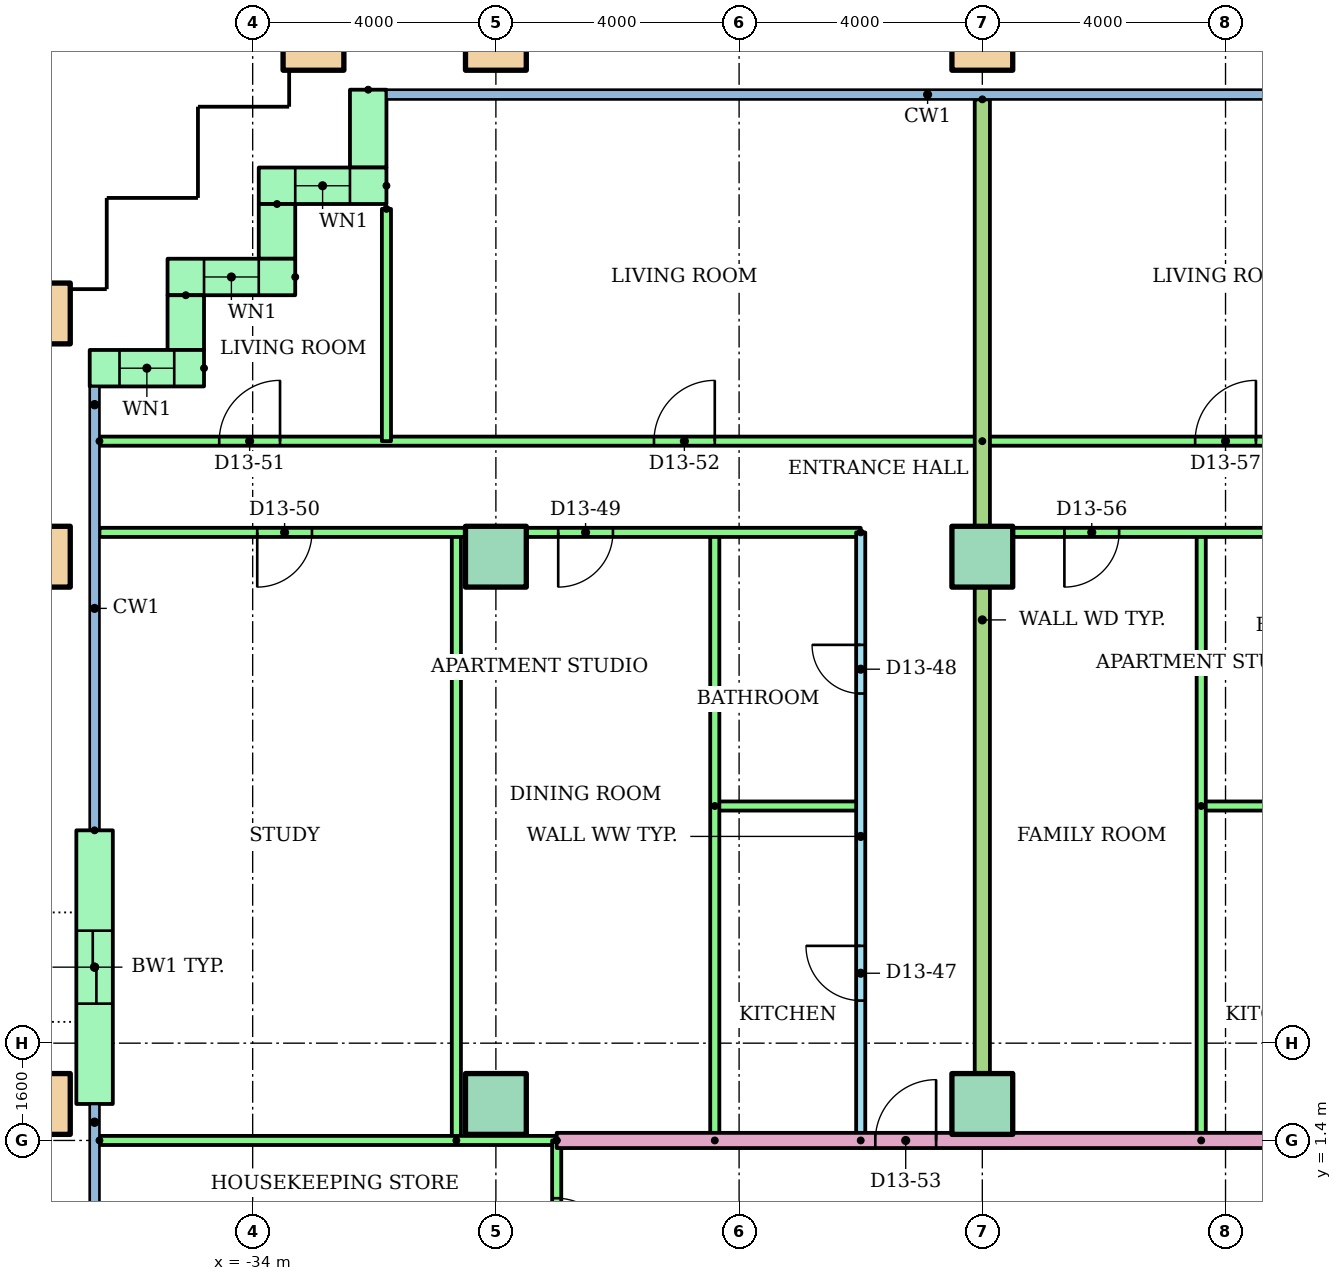
"""IFC4 building model, lengths in metres.
Left out: names, types, materials, properties, quantities, classifications, styles, units other than length and angle.
Written with IfcOpenShell. Run it as: python <this file> out.ifc"""

import sys

from ifc_helpers import new_model, si_unit, direction, frame, frame_2d, origin, origin_2d, place, context, subcontext, project, spatial, rectangle, hollow_rectangle, extrude, element, fill, save


model = new_model("IFC4")
c1 = context("Model", 3, precision=1e-05, world=origin(), true_north=direction((0.0, 1.0)))
c2 = subcontext(c1, "Body", "Model", "MODEL_VIEW")
j1 = project(units=[si_unit("LENGTHUNIT", "METRE"), si_unit("PLANEANGLEUNIT", "RADIAN")], contexts=[c1])
p1 = place(None, origin())
s1 = spatial("IfcSite", under=j1, at=p1, CompositionType="ELEMENT")
p2 = place(p1, origin())
s2 = spatial("IfcBuilding", under=s1, at=p2, CompositionType="ELEMENT")
p3 = place(p2, frame((0.0, 0.0, 51.2)))
s3 = spatial("IfcBuildingStorey", under=s2, at=p3, CompositionType="ELEMENT", Elevation=51.2)
p4 = place(p3, frame((-37.5, 2.0, 0.0)))
e1 = element("IfcColumn", 1, at=p4, inside=s3, PredefinedType="COLUMN", context=c2, shape_type="SweptSolid", body=[
    extrude(hollow_rectangle(XDim=1.0, YDim=1.0, WallThickness=0.05, at=origin_2d()), origin(), (0.0, 0.0, 1.0), 3.2),
])
for number, where in (
    (2, (-30.0, 2.0, 0.0)),
    (3, (-22.0, 2.0, 0.0)),
):
    element("IfcColumn", number, at=place(p3, frame(where)), inside=s3, PredefinedType="COLUMN", context=c2, shape_type="SweptSolid", body=[
        extrude(rectangle(XDim=1.0, YDim=1.0, at=origin_2d()), origin(), (0.0, 0.0, 1.0), 3.2),
    ])
p5 = place(p3, frame((-37.5, 11.0, 0.0)))
e4 = element("IfcColumn", 4, at=p5, inside=s3, PredefinedType="COLUMN", context=c2, shape_type="SweptSolid", body=[
    extrude(hollow_rectangle(XDim=1.0, YDim=1.0, WallThickness=0.05, at=origin_2d()), origin(), (0.0, 0.0, 1.0), 3.2),
])
for number, where in (
    (5, (-30.0, 11.0, 0.0)),
    (6, (-22.0, 11.0, 0.0)),
):
    element("IfcColumn", number, at=place(p3, frame(where)), inside=s3, PredefinedType="COLUMN", context=c2, shape_type="SweptSolid", body=[
        extrude(rectangle(XDim=1.0, YDim=1.0, at=origin_2d()), origin(), (0.0, 0.0, 1.0), 3.2),
    ])
for number, where in (
    (7, (-37.5, 15.0, 0.0)),
    (8, (-33.0, 19.5, 0.0)),
    (9, (-30.0, 19.5, 0.0)),
    (10, (-22.0, 19.5, 0.0)),
):
    element("IfcColumn", number, at=place(p3, frame(where)), inside=s3, PredefinedType="COLUMN", context=c2, shape_type="SweptSolid", body=[
        extrude(hollow_rectangle(XDim=1.0, YDim=1.0, WallThickness=0.05, at=origin_2d()), origin(), (0.0, 0.0, 1.0), 3.2),
    ])
p6 = place(p3, frame((-32.1, 18.68, 0.0), z_axis=(0.0, 0.0, 1.0), x_axis=(0.0, -1.0, 0.0)))
e11 = element("IfcWall", 11, at=p6, inside=s3, PredefinedType="STANDARD", context=c2, shape_type="SweptSolid", body=[
    extrude(rectangle(XDim=1.28, YDim=0.6, at=frame_2d((0.64, 0.0))), origin(), (0.0, 0.0, 1.0), 2.92),
])
p7 = place(p3, frame((-31.8, 17.1, 0.0), z_axis=(0.0, 0.0, 1.0), x_axis=(-1.0, 0.0, 0.0)))
e12 = element("IfcWall", 12, at=p7, inside=s3, PredefinedType="STANDARD", context=c2, shape_type="SweptSolid", body=[
    extrude(rectangle(XDim=2.1, YDim=0.6, at=frame_2d((1.05, 0.0))), origin(), (0.0, 0.0, 1.0), 2.92),
])
p8 = place(p7, frame((0.6, 0.0, 0.9)))
e13 = element("IfcOpeningElement", 13, at=p8, cuts=e12, PredefinedType="OPENING", context=c2, shape_type="SweptSolid", body=[
    extrude(rectangle(XDim=0.9, YDim=1.5, at=frame_2d((0.45, 0.75))), frame((0.0, 0.31, 0.0), z_axis=(0.0, -1.0, 0.0), x_axis=(1.0, 0.0, 0.0)), (0.0, 0.0, 1.0), 0.62),
])
p9 = place(p3, frame((-33.6, 16.8, 0.0), z_axis=(0.0, 0.0, 1.0), x_axis=(0.0, -1.0, 0.0)))
e14 = element("IfcWall", 14, at=p9, inside=s3, PredefinedType="STANDARD", context=c2, shape_type="SweptSolid", body=[
    extrude(rectangle(XDim=0.9, YDim=0.6, at=frame_2d((0.45, 0.0))), origin(), (0.0, 0.0, 1.0), 2.92),
])
p10 = place(p3, frame((-33.3, 15.6, 0.0), z_axis=(0.0, 0.0, 1.0), x_axis=(-1.0, 0.0, 0.0)))
e15 = element("IfcWall", 15, at=p10, inside=s3, PredefinedType="STANDARD", context=c2, shape_type="SweptSolid", body=[
    extrude(rectangle(XDim=2.1, YDim=0.6, at=frame_2d((1.05, 0.0))), origin(), (0.0, 0.0, 1.0), 2.92),
])
p11 = place(p10, frame((0.6, 0.0, 0.9)))
e16 = element("IfcOpeningElement", 16, at=p11, cuts=e15, PredefinedType="OPENING", context=c2, shape_type="SweptSolid", body=[
    extrude(rectangle(XDim=0.9, YDim=1.5, at=frame_2d((0.45, 0.75))), frame((0.0, 0.31, 0.0), z_axis=(0.0, -1.0, 0.0), x_axis=(1.0, 0.0, 0.0)), (0.0, 0.0, 1.0), 0.62),
])
p12 = place(p3, frame((-35.1, 15.3, 0.0), z_axis=(0.0, 0.0, 1.0), x_axis=(0.0, -1.0, 0.0)))
e17 = element("IfcWall", 17, at=p12, inside=s3, PredefinedType="STANDARD", context=c2, shape_type="SweptSolid", body=[
    extrude(rectangle(XDim=0.9, YDim=0.6, at=frame_2d((0.45, 0.0))), origin(), (0.0, 0.0, 1.0), 2.92),
])
p13 = place(p3, frame((-34.8, 14.1, 0.0), z_axis=(0.0, 0.0, 1.0), x_axis=(-1.0, 0.0, 0.0)))
e18 = element("IfcWall", 18, at=p13, inside=s3, PredefinedType="STANDARD", context=c2, shape_type="SweptSolid", body=[
    extrude(rectangle(XDim=1.88, YDim=0.6, at=frame_2d((0.94, 0.0))), origin(), (0.0, 0.0, 1.0), 2.92),
])
p14 = place(p13, frame((0.49, 0.0, 0.9)))
e19 = element("IfcOpeningElement", 19, at=p14, cuts=e18, PredefinedType="OPENING", context=c2, shape_type="SweptSolid", body=[
    extrude(rectangle(XDim=0.9, YDim=1.5, at=frame_2d((0.45, 0.75))), frame((0.0, 0.31, 0.0), z_axis=(0.0, -1.0, 0.0), x_axis=(1.0, 0.0, 0.0)), (0.0, 0.0, 1.0), 0.62),
])
p15 = place(p3, frame((-36.6, 6.5, 0.0), z_axis=(0.0, 0.0, 1.0), x_axis=(0.0, -1.0, 0.0)))
e20 = element("IfcWall", 20, at=p15, inside=s3, PredefinedType="STANDARD", context=c2, shape_type="SweptSolid", body=[
    extrude(rectangle(XDim=4.5, YDim=0.6, at=frame_2d((2.25, 0.0))), origin(), (0.0, 0.0, 1.0), 2.92),
])
p16 = place(p15, frame((1.65, 0.0, 0.0)))
e21 = element("IfcOpeningElement", 21, at=p16, cuts=e20, PredefinedType="OPENING", context=c2, shape_type="SweptSolid", body=[
    extrude(rectangle(XDim=1.2, YDim=2.1, at=frame_2d((0.6, 1.05))), frame((0.0, 0.31, 0.0), z_axis=(0.0, -1.0, 0.0), x_axis=(1.0, 0.0, 0.0)), (0.0, 0.0, 1.0), 0.62),
])
p17 = place(p3, frame((-24.0, 1.4, 0.0), z_axis=(0.0, 0.0, 1.0), x_axis=(0.0, 1.0, 0.0)))
e22 = element("IfcWall", 22, at=p17, inside=s3, PredefinedType="PARTITIONING", context=c2, shape_type="SweptSolid", body=[
    extrude(rectangle(XDim=10.0, YDim=0.15, at=frame_2d((5.0, 0.0))), origin(), (0.0, 0.0, 1.0), 2.4),
])
p18 = place(p17, frame((2.3, 0.0, 0.0)))
e23 = element("IfcOpeningElement", 23, at=p18, cuts=e22, PredefinedType="OPENING", context=c2, shape_type="SweptSolid", body=[
    extrude(rectangle(XDim=0.9, YDim=2.1, at=frame_2d((0.45, 1.05))), frame((0.0, 0.085, 0.0), z_axis=(0.0, -1.0, 0.0), x_axis=(1.0, 0.0, 0.0)), (0.0, 0.0, 1.0), 0.17),
])
p19 = place(p17, frame((7.35, 0.0, 0.0)))
e24 = element("IfcOpeningElement", 24, at=p19, cuts=e22, PredefinedType="OPENING", context=c2, shape_type="SweptSolid", body=[
    extrude(rectangle(XDim=0.8, YDim=2.1, at=frame_2d((0.4, 1.05))), frame((0.0, 0.085, 0.0), z_axis=(0.0, -1.0, 0.0), x_axis=(1.0, 0.0, 0.0)), (0.0, 0.0, 1.0), 0.17),
])
p20 = place(p3, frame((-26.4, 6.9, 0.0)))
e25 = element("IfcWall", 25, at=p20, inside=s3, PredefinedType="PARTITIONING", context=c2, shape_type="SweptSolid", body=[
    extrude(rectangle(XDim=2.4, YDim=0.15, at=frame_2d((1.2, 0.0))), origin(), (0.0, 0.0, 1.0), 2.4),
])
for number, where, z_axis, x_axis in (
    (26, (-26.4, 1.4, 0.0), (0.0, 0.0, 1.0), (0.0, 1.0, 0.0)),
    (27, (-30.65, 1.4, 0.0), (0.0, 0.0, 1.0), (0.0, 1.0, 0.0)),
):
    element("IfcWall", number, at=place(p3, frame(where, z_axis=z_axis, x_axis=x_axis)), inside=s3, PredefinedType="PARTITIONING", context=c2, shape_type="SweptSolid", body=[
        extrude(rectangle(XDim=10.0, YDim=0.15, at=frame_2d((5.0, 0.0))), origin(), (0.0, 0.0, 1.0), 2.4),
    ])
p21 = place(p3, frame((-24.0, 11.4, 0.0), z_axis=(0.0, 0.0, 1.0), x_axis=(-1.0, 0.0, 0.0)))
e28 = element("IfcWall", 28, at=p21, inside=s3, PredefinedType="PARTITIONING", context=c2, shape_type="SweptSolid", body=[
    extrude(rectangle(XDim=12.52, YDim=0.15, at=frame_2d((6.26, 0.0))), origin(), (0.0, 0.0, 1.0), 2.4),
])
p22 = place(p21, frame((4.075, 0.0, 0.0)))
e29 = element("IfcOpeningElement", 29, at=p22, cuts=e28, PredefinedType="OPENING", context=c2, shape_type="SweptSolid", body=[
    extrude(rectangle(XDim=0.9, YDim=2.1, at=frame_2d((0.45, 1.05))), frame((0.0, 0.085, 0.0), z_axis=(0.0, -1.0, 0.0), x_axis=(1.0, 0.0, 0.0)), (0.0, 0.0, 1.0), 0.17),
])
p23 = place(p21, frame((9.025, 0.0, 0.0)))
e30 = element("IfcOpeningElement", 30, at=p23, cuts=e28, PredefinedType="OPENING", context=c2, shape_type="SweptSolid", body=[
    extrude(rectangle(XDim=0.9, YDim=2.1, at=frame_2d((0.45, 1.05))), frame((0.0, 0.085, 0.0), z_axis=(0.0, -1.0, 0.0), x_axis=(1.0, 0.0, 0.0)), (0.0, 0.0, 1.0), 0.17),
])
p24 = place(p3, frame((-36.52, 12.9, 0.0)))
e31 = element("IfcWall", 31, at=p24, inside=s3, PredefinedType="PARTITIONING", context=c2, shape_type="SweptSolid", body=[
    extrude(rectangle(XDim=14.52, YDim=0.15, at=frame_2d((7.26, 0.0))), origin(), (0.0, 0.0, 1.0), 2.4),
])
p25 = place(p24, frame((1.97, 0.0, 0.0)))
e32 = element("IfcOpeningElement", 32, at=p25, cuts=e31, PredefinedType="OPENING", context=c2, shape_type="SweptSolid", body=[
    extrude(rectangle(XDim=1.0, YDim=2.1, at=frame_2d((0.5, 1.05))), frame((0.0, 0.085, 0.0), z_axis=(0.0, -1.0, 0.0), x_axis=(1.0, 0.0, 0.0)), (0.0, 0.0, 1.0), 0.17),
])
p26 = place(p24, frame((9.12, 0.0, 0.0)))
e33 = element("IfcOpeningElement", 33, at=p26, cuts=e31, PredefinedType="OPENING", context=c2, shape_type="SweptSolid", body=[
    extrude(rectangle(XDim=1.0, YDim=2.1, at=frame_2d((0.5, 1.05))), frame((0.0, 0.085, 0.0), z_axis=(0.0, -1.0, 0.0), x_axis=(1.0, 0.0, 0.0)), (0.0, 0.0, 1.0), 0.17),
])
p27 = place(p3, frame((-31.8, 16.72, 0.0), z_axis=(0.0, 0.0, 1.0), x_axis=(0.0, -1.0, 0.0)))
e34 = element("IfcWall", 34, at=p27, inside=s3, PredefinedType="PARTITIONING", context=c2, shape_type="SweptSolid", body=[
    extrude(rectangle(XDim=3.82, YDim=0.15, at=frame_2d((1.91, 0.0))), origin(), (0.0, 0.0, 1.0), 2.4),
])
p28 = place(p3, frame((-18.4, 6.9, 0.0)))
e35 = element("IfcWall", 35, at=p28, inside=s3, PredefinedType="PARTITIONING", context=c2, shape_type="SweptSolid", body=[
    extrude(rectangle(XDim=2.4, YDim=0.15, at=frame_2d((1.2, 0.0))), origin(), (0.0, 0.0, 1.0), 2.4),
])
p29 = place(p3, frame((-18.4, 1.4, 0.0), z_axis=(0.0, 0.0, 1.0), x_axis=(0.0, 1.0, 0.0)))
e36 = element("IfcWall", 36, at=p29, inside=s3, PredefinedType="PARTITIONING", context=c2, shape_type="SweptSolid", body=[
    extrude(rectangle(XDim=10.0, YDim=0.15, at=frame_2d((5.0, 0.0))), origin(), (0.0, 0.0, 1.0), 2.4),
])
p30 = place(p3, frame((-16.0, 11.4, 0.0), z_axis=(0.0, 0.0, 1.0), x_axis=(-1.0, 0.0, 0.0)))
e37 = element("IfcWall", 37, at=p30, inside=s3, PredefinedType="PARTITIONING", context=c2, shape_type="SweptSolid", body=[
    extrude(rectangle(XDim=6.0, YDim=0.15, at=frame_2d((3.0, 0.0))), origin(), (0.0, 0.0, 1.0), 2.4),
])
p31 = place(p30, frame((3.75, 0.0, 0.0)))
e38 = element("IfcOpeningElement", 38, at=p31, cuts=e37, PredefinedType="OPENING", context=c2, shape_type="SweptSolid", body=[
    extrude(rectangle(XDim=0.9, YDim=2.1, at=frame_2d((0.45, 1.05))), frame((0.0, 0.085, 0.0), z_axis=(0.0, -1.0, 0.0), x_axis=(1.0, 0.0, 0.0)), (0.0, 0.0, 1.0), 0.17),
])
p32 = place(p3, frame((-22.0, 12.9, 0.0)))
e39 = element("IfcWall", 39, at=p32, inside=s3, PredefinedType="PARTITIONING", context=c2, shape_type="SweptSolid", body=[
    extrude(rectangle(XDim=8.0, YDim=0.15, at=frame_2d((4.0, 0.0))), origin(), (0.0, 0.0, 1.0), 2.4),
])
p33 = place(p32, frame((3.5, 0.0, 0.0)))
e40 = element("IfcOpeningElement", 40, at=p33, cuts=e39, PredefinedType="OPENING", context=c2, shape_type="SweptSolid", body=[
    extrude(rectangle(XDim=1.0, YDim=2.1, at=frame_2d((0.5, 1.05))), frame((0.0, 0.085, 0.0), z_axis=(0.0, -1.0, 0.0), x_axis=(1.0, 0.0, 0.0)), (0.0, 0.0, 1.0), 0.17),
])
p34 = place(p3, frame((-22.0, 18.521, 0.0), z_axis=(0.0, 0.0, 1.0), x_axis=(0.0, -1.0, 0.0)))
e41 = element("IfcWall", 41, at=p34, inside=s3, PredefinedType="PARTITIONING", context=c2, shape_type="SweptSolid", body=[
    extrude(rectangle(XDim=17.121, YDim=0.25, at=frame_2d((8.561, 0.0))), origin(), (0.0, 0.0, 1.0), 2.4),
])
p35 = place(p3, frame((-29.0, 1.4, 0.0)))
e42 = element("IfcWall", 42, at=p35, inside=s3, PredefinedType="PARTITIONING", context=c2, shape_type="SweptSolid", body=[
    extrude(rectangle(XDim=15.0, YDim=0.25, at=frame_2d((7.5, 0.0))), origin(), (0.0, 0.0, 1.0), 2.4),
])
p36 = place(p35, frame((5.24, 0.0, 0.0)))
e43 = element("IfcOpeningElement", 43, at=p36, cuts=e42, PredefinedType="OPENING", context=c2, shape_type="SweptSolid", body=[
    extrude(rectangle(XDim=1.0, YDim=2.1, at=frame_2d((0.5, 1.05))), frame((0.0, 0.135, 0.0), z_axis=(0.0, -1.0, 0.0), x_axis=(1.0, 0.0, 0.0)), (0.0, 0.0, 1.0), 0.27),
])
p37 = place(p35, frame((13.5, 0.0, 0.0)))
e44 = element("IfcOpeningElement", 44, at=p37, cuts=e42, PredefinedType="OPENING", context=c2, shape_type="SweptSolid", body=[
    extrude(rectangle(XDim=1.0, YDim=2.1, at=frame_2d((0.5, 1.05))), frame((0.0, 0.135, 0.0), z_axis=(0.0, -1.0, 0.0), x_axis=(1.0, 0.0, 0.0)), (0.0, 0.0, 1.0), 0.27),
])
p38 = place(p3, frame((-36.52, 1.4, 0.0)))
e45 = element("IfcWall", 45, at=p38, inside=s3, PredefinedType="PARTITIONING", context=c2, shape_type="SweptSolid", body=[
    extrude(rectangle(XDim=7.52, YDim=0.15, at=frame_2d((3.76, 0.0))), origin(), (0.0, 0.0, 1.0), 2.4),
])
p39 = place(p3, frame((-29.0, 1.4, 0.0), z_axis=(0.0, 0.0, 1.0), x_axis=(0.0, -1.0, 0.0)))
e46 = element("IfcWall", 46, at=p39, inside=s3, PredefinedType="PARTITIONING", context=c2, shape_type="SweptSolid", body=[
    extrude(rectangle(XDim=2.8, YDim=0.15, at=frame_2d((1.4, 0.0))), origin(), (0.0, 0.0, 1.0), 2.4),
])
p40 = place(p39, frame((0.95, 0.0, 0.0)))
e47 = element("IfcOpeningElement", 47, at=p40, cuts=e46, PredefinedType="OPENING", context=c2, shape_type="SweptSolid", body=[
    extrude(rectangle(XDim=0.9, YDim=2.1, at=frame_2d((0.45, 1.05))), frame((0.0, 0.085, 0.0), z_axis=(0.0, -1.0, 0.0), x_axis=(1.0, 0.0, 0.0)), (0.0, 0.0, 1.0), 0.17),
])
p41 = place(p8, origin())
e48 = element("IfcWindow", 48, at=p41, inside=s3, PartitioningType="SINGLE_PANEL", PredefinedType="WINDOW", context=c2, shape_type="SweptSolid", body=[
    extrude(rectangle(XDim=0.9, YDim=1.5, at=frame_2d((0.45, 0.75))), frame((0.0, 0.03, 0.0), z_axis=(0.0, -1.0, 0.0), x_axis=(1.0, 0.0, 0.0)), (0.0, 0.0, 1.0), 0.06),
])
fill(e13, e48)
p42 = place(p11, origin())
e49 = element("IfcWindow", 49, at=p42, inside=s3, PartitioningType="SINGLE_PANEL", PredefinedType="WINDOW", context=c2, shape_type="SweptSolid", body=[
    extrude(rectangle(XDim=0.9, YDim=1.5, at=frame_2d((0.45, 0.75))), frame((0.0, 0.03, 0.0), z_axis=(0.0, -1.0, 0.0), x_axis=(1.0, 0.0, 0.0)), (0.0, 0.0, 1.0), 0.06),
])
fill(e16, e49)
p43 = place(p14, origin())
e50 = element("IfcWindow", 50, at=p43, inside=s3, PartitioningType="SINGLE_PANEL", PredefinedType="WINDOW", context=c2, shape_type="SweptSolid", body=[
    extrude(rectangle(XDim=0.9, YDim=1.5, at=frame_2d((0.45, 0.75))), frame((0.0, 0.03, 0.0), z_axis=(0.0, -1.0, 0.0), x_axis=(1.0, 0.0, 0.0)), (0.0, 0.0, 1.0), 0.06),
])
fill(e19, e50)
p44 = place(p18, origin())
e51 = element("IfcDoor", 51, at=p44, inside=s3, OperationType="SINGLE_SWING_RIGHT", PredefinedType="DOOR", context=c2, shape_type="SweptSolid", body=[
    extrude(rectangle(XDim=0.9, YDim=2.1, at=frame_2d((0.45, 1.05))), frame((0.0, 0.025, 0.0), z_axis=(0.0, -1.0, 0.0), x_axis=(1.0, 0.0, 0.0)), (0.0, 0.0, 1.0), 0.05),
])
fill(e23, e51)
p45 = place(p19, origin())
e52 = element("IfcDoor", 52, at=p45, inside=s3, OperationType="SINGLE_SWING_RIGHT", PredefinedType="DOOR", context=c2, shape_type="SweptSolid", body=[
    extrude(rectangle(XDim=0.8, YDim=2.1, at=frame_2d((0.4, 1.05))), frame((0.0, 0.025, 0.0), z_axis=(0.0, -1.0, 0.0), x_axis=(1.0, 0.0, 0.0)), (0.0, 0.0, 1.0), 0.05),
])
fill(e24, e52)
p46 = place(p22, origin())
e53 = element("IfcDoor", 53, at=p46, inside=s3, OperationType="SINGLE_SWING_RIGHT", PredefinedType="DOOR", context=c2, shape_type="SweptSolid", body=[
    extrude(rectangle(XDim=0.9, YDim=2.1, at=frame_2d((0.45, 1.05))), frame((0.0, 0.025, 0.0), z_axis=(0.0, -1.0, 0.0), x_axis=(1.0, 0.0, 0.0)), (0.0, 0.0, 1.0), 0.05),
])
fill(e29, e53)
p47 = place(p23, origin())
e54 = element("IfcDoor", 54, at=p47, inside=s3, OperationType="SINGLE_SWING_RIGHT", PredefinedType="DOOR", context=c2, shape_type="SweptSolid", body=[
    extrude(rectangle(XDim=0.9, YDim=2.1, at=frame_2d((0.45, 1.05))), frame((0.0, 0.025, 0.0), z_axis=(0.0, -1.0, 0.0), x_axis=(1.0, 0.0, 0.0)), (0.0, 0.0, 1.0), 0.05),
])
fill(e30, e54)
p48 = place(p25, origin())
e55 = element("IfcDoor", 55, at=p48, inside=s3, OperationType="SINGLE_SWING_RIGHT", PredefinedType="DOOR", context=c2, shape_type="SweptSolid", body=[
    extrude(rectangle(XDim=1.0, YDim=2.1, at=frame_2d((0.5, 1.05))), frame((0.0, 0.025, 0.0), z_axis=(0.0, -1.0, 0.0), x_axis=(1.0, 0.0, 0.0)), (0.0, 0.0, 1.0), 0.05),
])
fill(e32, e55)
p49 = place(p26, origin())
e56 = element("IfcDoor", 56, at=p49, inside=s3, OperationType="SINGLE_SWING_RIGHT", PredefinedType="DOOR", context=c2, shape_type="SweptSolid", body=[
    extrude(rectangle(XDim=1.0, YDim=2.1, at=frame_2d((0.5, 1.05))), frame((0.0, 0.025, 0.0), z_axis=(0.0, -1.0, 0.0), x_axis=(1.0, 0.0, 0.0)), (0.0, 0.0, 1.0), 0.05),
])
fill(e33, e56)
p50 = place(p36, origin())
e57 = element("IfcDoor", 57, at=p50, inside=s3, OperationType="SINGLE_SWING_RIGHT", PredefinedType="DOOR", context=c2, shape_type="SweptSolid", body=[
    extrude(rectangle(XDim=1.0, YDim=2.1, at=frame_2d((0.5, 1.05))), frame((0.0, 0.025, 0.0), z_axis=(0.0, -1.0, 0.0), x_axis=(1.0, 0.0, 0.0)), (0.0, 0.0, 1.0), 0.05),
])
fill(e43, e57)
p51 = place(p31, origin())
e58 = element("IfcDoor", 58, at=p51, inside=s3, OperationType="SINGLE_SWING_RIGHT", PredefinedType="DOOR", context=c2, shape_type="SweptSolid", body=[
    extrude(rectangle(XDim=0.9, YDim=2.1, at=frame_2d((0.45, 1.05))), frame((0.0, 0.025, 0.0), z_axis=(0.0, -1.0, 0.0), x_axis=(1.0, 0.0, 0.0)), (0.0, 0.0, 1.0), 0.05),
])
fill(e38, e58)
p52 = place(p33, origin())
e59 = element("IfcDoor", 59, at=p52, inside=s3, OperationType="SINGLE_SWING_RIGHT", PredefinedType="DOOR", context=c2, shape_type="SweptSolid", body=[
    extrude(rectangle(XDim=1.0, YDim=2.1, at=frame_2d((0.5, 1.05))), frame((0.0, 0.025, 0.0), z_axis=(0.0, -1.0, 0.0), x_axis=(1.0, 0.0, 0.0)), (0.0, 0.0, 1.0), 0.05),
])
fill(e40, e59)
p53 = place(p40, origin())
e60 = element("IfcDoor", 60, at=p53, inside=s3, OperationType="SINGLE_SWING_RIGHT", PredefinedType="DOOR", context=c2, shape_type="SweptSolid", body=[
    extrude(rectangle(XDim=0.9, YDim=2.1, at=frame_2d((0.45, 1.05))), frame((0.0, 0.025, 0.0), z_axis=(0.0, -1.0, 0.0), x_axis=(1.0, 0.0, 0.0)), (0.0, 0.0, 1.0), 0.05),
])
fill(e47, e60)
p54 = place(p16, origin())
e61 = element("IfcDoor", 61, at=p54, inside=s3, OperationType="SLIDING_TO_LEFT", PredefinedType="DOOR", context=c2, shape_type="SweptSolid", body=[
    extrude(rectangle(XDim=1.2, YDim=2.1, at=frame_2d((0.6, 1.05))), frame((0.0, 0.025, 0.0), z_axis=(0.0, -1.0, 0.0), x_axis=(1.0, 0.0, 0.0)), (0.0, 0.0, 1.0), 0.05),
])
fill(e21, e61)
save(model, sys.argv[1])
